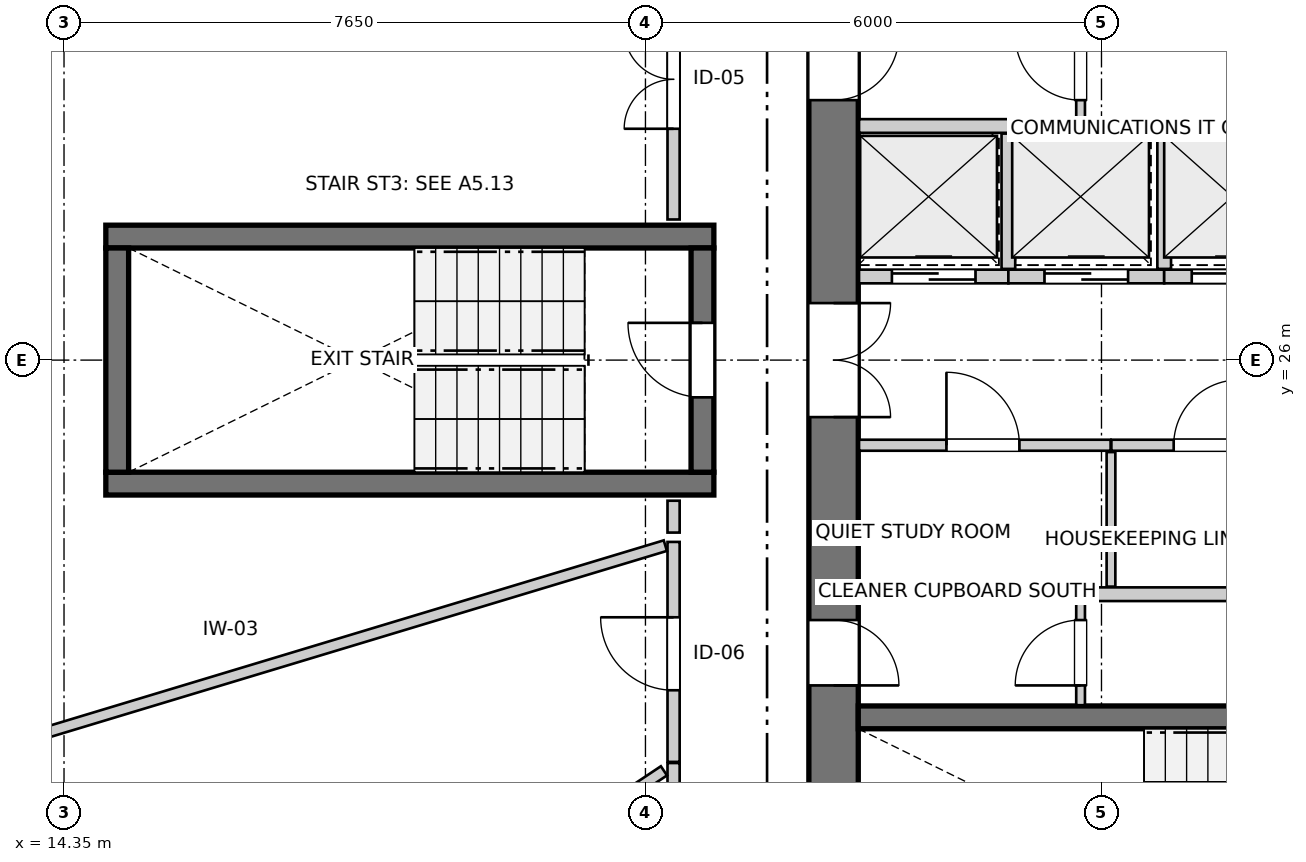
"""IFC4 building model, lengths in metres.
Left out: names, types, materials, properties, quantities, classifications, styles, units other than length and angle.
Written with IfcOpenShell. Run it as: python <this file> out.ifc"""

import sys

from ifc_helpers import new_model, si_unit, direction, frame, frame_2d, origin, place, context, subcontext, project, spatial, rectangle, extrude, source, transform, mapped, element, fill, save


model = new_model("IFC4")
c1 = context("Model", 3, precision=1e-05, world=origin(), true_north=direction((0.0, 1.0)))
c2 = subcontext(c1, "Body", "Model", "MODEL_VIEW")
j1 = project(units=[si_unit("LENGTHUNIT", "METRE"), si_unit("PLANEANGLEUNIT", "RADIAN")], contexts=[c1])
p1 = place(None, origin())
s1 = spatial("IfcSite", under=j1, at=p1, CompositionType="ELEMENT")
p2 = place(p1, origin())
s2 = spatial("IfcBuilding", under=s1, at=p2, CompositionType="ELEMENT")
p3 = place(p2, frame((0.0, 0.0, 142.6)))
s3 = spatial("IfcBuildingStorey", under=s2, at=p3, CompositionType="ELEMENT", Elevation=142.6)
p4 = place(p3, frame((24.475, 33.8, 0.0), z_axis=(0.0, 0.0, 1.0), x_axis=(0.0, -1.0, 0.0)))
e1 = element("IfcWall", 1, at=p4, inside=s3, PredefinedType="SHEAR", context=c2, shape_type="SweptSolid", body=[
    extrude(rectangle(XDim=15.6, YDim=0.65, at=frame_2d((7.8, 0.0))), origin(), (0.0, 0.0, 1.0), 2.95),
])
p5 = place(p4, frame((7.05, 0.0, 0.0)))
e2 = element("IfcOpeningElement", 2, at=p5, cuts=e1, PredefinedType="OPENING", context=c2, shape_type="SweptSolid", body=[
    extrude(rectangle(XDim=1.5, YDim=2.15, at=frame_2d((0.75, 1.075))), frame((0.0, 0.335, 0.0), z_axis=(0.0, -1.0, 0.0), x_axis=(1.0, 0.0, 0.0)), (0.0, 0.0, 1.0), 0.67),
])
p6 = place(p4, frame((3.52, 0.0, 0.0)))
e3 = element("IfcOpeningElement", 3, at=p6, cuts=e1, PredefinedType="OPENING", context=c2, shape_type="SweptSolid", body=[
    extrude(rectangle(XDim=0.86, YDim=2.05, at=frame_2d((0.43, 1.025))), frame((0.0, 0.335, 0.0), z_axis=(0.0, -1.0, 0.0), x_axis=(1.0, 0.0, 0.0)), (0.0, 0.0, 1.0), 0.67),
])
p7 = place(p4, frame((11.22, 0.0, 0.0)))
e4 = element("IfcOpeningElement", 4, at=p7, cuts=e1, PredefinedType="OPENING", context=c2, shape_type="SweptSolid", body=[
    extrude(rectangle(XDim=0.86, YDim=2.05, at=frame_2d((0.43, 1.025))), frame((0.0, 0.335, 0.0), z_axis=(0.0, -1.0, 0.0), x_axis=(1.0, 0.0, 0.0)), (0.0, 0.0, 1.0), 0.67),
])
p8 = place(p3, frame((24.8, 21.3, 0.0), z_axis=(0.0, 0.0, 1.0), x_axis=(1.0, 0.0, 0.0)))
e5 = element("IfcWall", 5, at=p8, inside=s3, PredefinedType="SHEAR", context=c2, shape_type="SweptSolid", body=[
    extrude(rectangle(XDim=11.1, YDim=0.3, at=frame_2d((5.55, 0.0))), origin(), (0.0, 0.0, 1.0), 2.95),
])
p9 = place(p8, frame((6.22, 0.0, 0.0)))
e6 = element("IfcOpeningElement", 6, at=p9, cuts=e5, PredefinedType="OPENING", context=c2, shape_type="SweptSolid", body=[
    extrude(rectangle(XDim=0.98, YDim=2.15, at=frame_2d((0.49, 1.075))), frame((0.0, 0.16, 0.0), z_axis=(0.0, -1.0, 0.0), x_axis=(1.0, 0.0, 0.0)), (0.0, 0.0, 1.0), 0.32),
])
p10 = place(p8, frame((9.15, 0.0, 0.0)))
e7 = element("IfcOpeningElement", 7, at=p10, cuts=e5, PredefinedType="OPENING", context=c2, shape_type="SweptSolid", body=[
    extrude(rectangle(XDim=1.15, YDim=2.15, at=frame_2d((0.575, 1.075))), frame((0.0, 0.16, 0.0), z_axis=(0.0, -1.0, 0.0), x_axis=(1.0, 0.0, 0.0)), (0.0, 0.0, 1.0), 0.32),
])
for number, where, z_axis, x_axis in (
    (8, (14.9, 24.375, 0.0), (0.0, 0.0, 1.0), (1.0, 0.0, 0.0)),
    (9, (22.9, 27.625, 0.0), (0.0, 0.0, 1.0), (-1.0, 0.0, 0.0)),
):
    element("IfcWall", number, at=place(p3, frame(where, z_axis=z_axis, x_axis=x_axis)), inside=s3, PredefinedType="SHEAR", context=c2, shape_type="SweptSolid", body=[
        extrude(rectangle(XDim=8.0, YDim=0.3, at=frame_2d((4.0, 0.0))), origin(), (0.0, 0.0, 1.0), 2.95),
    ])
p11 = place(p3, frame((15.05, 27.475, 0.0), z_axis=(0.0, 0.0, 1.0), x_axis=(0.0, -1.0, 0.0)))
e10 = element("IfcWall", 10, at=p11, inside=s3, PredefinedType="SHEAR", context=c2, shape_type="SweptSolid", body=[
    extrude(rectangle(XDim=2.95, YDim=0.3, at=frame_2d((1.475, 0.0))), origin(), (0.0, 0.0, 1.0), 2.95),
])
p12 = place(p3, frame((22.75, 24.525, 0.0), z_axis=(0.0, 0.0, 1.0), x_axis=(0.0, 1.0, 0.0)))
e11 = element("IfcWall", 11, at=p12, inside=s3, PredefinedType="SHEAR", context=c2, shape_type="SweptSolid", body=[
    extrude(rectangle(XDim=2.95, YDim=0.3, at=frame_2d((1.475, 0.0))), origin(), (0.0, 0.0, 1.0), 2.95),
])
p13 = place(p12, frame((0.985, 0.0, 0.0)))
e12 = element("IfcOpeningElement", 12, at=p13, cuts=e11, PredefinedType="OPENING", context=c2, shape_type="SweptSolid", body=[
    extrude(rectangle(XDim=0.98, YDim=2.15, at=frame_2d((0.49, 1.075))), frame((0.0, 0.16, 0.0), z_axis=(0.0, -1.0, 0.0), x_axis=(1.0, 0.0, 0.0)), (0.0, 0.0, 1.0), 0.32),
])
p14 = place(p3, frame((24.81, 22.92, 0.0), z_axis=(0.0, 0.0, 1.0), x_axis=(1.0, 0.0, 0.0)))
e13 = element("IfcWall", 13, at=p14, inside=s3, PredefinedType="PARTITIONING", context=c2, shape_type="SweptSolid", body=[
    extrude(rectangle(XDim=5.84, YDim=0.18, at=frame_2d((2.92, 0.0))), origin(), (0.0, 0.0, 1.0), 2.95),
])
p15 = place(p3, frame((24.81, 24.88, 0.0), z_axis=(0.0, 0.0, 1.0), x_axis=(1.0, 0.0, 0.0)))
e14 = element("IfcWall", 14, at=p15, inside=s3, PredefinedType="PARTITIONING", context=c2, shape_type="SweptSolid", body=[
    extrude(rectangle(XDim=3.31, YDim=0.145, at=frame_2d((1.655, 0.0))), origin(), (0.0, 0.0, 1.0), 2.95),
])
p16 = place(p15, frame((1.15, 0.0, 0.0)))
e15 = element("IfcOpeningElement", 15, at=p16, cuts=e14, PredefinedType="OPENING", context=c2, shape_type="SweptSolid", body=[
    extrude(rectangle(XDim=0.96, YDim=2.1, at=frame_2d((0.48, 1.05))), frame((0.0, 0.083, 0.0), z_axis=(0.0, -1.0, 0.0), x_axis=(1.0, 0.0, 0.0)), (0.0, 0.0, 1.0), 0.165),
])
p17 = place(p3, frame((28.13, 24.88, 0.0), z_axis=(0.0, 0.0, 1.0), x_axis=(1.0, 0.0, 0.0)))
e16 = element("IfcWall", 16, at=p17, inside=s3, PredefinedType="PARTITIONING", context=c2, shape_type="SweptSolid", body=[
    extrude(rectangle(XDim=2.52, YDim=0.145, at=frame_2d((1.26, 0.0))), origin(), (0.0, 0.0, 1.0), 2.95),
])
p18 = place(p17, frame((0.82, 0.0, 0.0)))
e17 = element("IfcOpeningElement", 17, at=p18, cuts=e16, PredefinedType="OPENING", context=c2, shape_type="SweptSolid", body=[
    extrude(rectangle(XDim=0.86, YDim=2.05, at=frame_2d((0.43, 1.025))), frame((0.0, 0.083, 0.0), z_axis=(0.0, -1.0, 0.0), x_axis=(1.0, 0.0, 0.0)), (0.0, 0.0, 1.0), 0.165),
])
p19 = place(p3, frame((28.125, 23.02, 0.0), z_axis=(0.0, 0.0, 1.0), x_axis=(0.0, 1.0, 0.0)))
e18 = element("IfcWall", 18, at=p19, inside=s3, PredefinedType="PARTITIONING", context=c2, shape_type="SweptSolid", body=[
    extrude(rectangle(XDim=1.77, YDim=0.115, at=frame_2d((0.885, 0.0))), origin(), (0.0, 0.0, 1.0), 2.95),
])
p20 = place(p3, frame((24.81, 29.08, 0.0), z_axis=(0.0, 0.0, 1.0), x_axis=(1.0, 0.0, 0.0)))
e19 = element("IfcWall", 19, at=p20, inside=s3, PredefinedType="PARTITIONING", context=c2, shape_type="SweptSolid", body=[
    extrude(rectangle(XDim=5.84, YDim=0.18, at=frame_2d((2.92, 0.0))), origin(), (0.0, 0.0, 1.0), 2.95),
])
p21 = place(p3, frame((24.81, 27.1, 0.0), z_axis=(0.0, 0.0, 1.0), x_axis=(1.0, 0.0, 0.0)))
e20 = element("IfcWall", 20, at=p21, inside=s3, PredefinedType="PARTITIONING", context=c2, shape_type="SweptSolid", body=[
    extrude(rectangle(XDim=1.965, YDim=0.18, at=frame_2d((0.982, 0.0))), origin(), (0.0, 0.0, 1.0), 2.95),
])
p22 = place(p21, frame((0.433, 0.0, 0.0)))
e21 = element("IfcOpeningElement", 21, at=p22, cuts=e20, PredefinedType="OPENING", context=c2, shape_type="SweptSolid", body=[
    extrude(rectangle(XDim=1.1, YDim=2.15, at=frame_2d((0.55, 1.075))), frame((0.0, 0.1, 0.0), z_axis=(0.0, -1.0, 0.0), x_axis=(1.0, 0.0, 0.0)), (0.0, 0.0, 1.0), 0.2),
])
p23 = place(p3, frame((26.775, 27.1, 0.0), z_axis=(0.0, 0.0, 1.0), x_axis=(1.0, 0.0, 0.0)))
e22 = element("IfcWall", 22, at=p23, inside=s3, PredefinedType="PARTITIONING", context=c2, shape_type="SweptSolid", body=[
    extrude(rectangle(XDim=2.05, YDim=0.18, at=frame_2d((1.025, 0.0))), origin(), (0.0, 0.0, 1.0), 2.95),
])
p24 = place(p23, frame((0.475, 0.0, 0.0)))
e23 = element("IfcOpeningElement", 23, at=p24, cuts=e22, PredefinedType="OPENING", context=c2, shape_type="SweptSolid", body=[
    extrude(rectangle(XDim=1.1, YDim=2.15, at=frame_2d((0.55, 1.075))), frame((0.0, 0.1, 0.0), z_axis=(0.0, -1.0, 0.0), x_axis=(1.0, 0.0, 0.0)), (0.0, 0.0, 1.0), 0.2),
])
p25 = place(p3, frame((26.775, 27.2, 0.0), z_axis=(0.0, 0.0, 1.0), x_axis=(0.0, 1.0, 0.0)))
e24 = element("IfcWall", 24, at=p25, inside=s3, PredefinedType="PARTITIONING", context=c2, shape_type="SweptSolid", body=[
    extrude(rectangle(XDim=1.78, YDim=0.18, at=frame_2d((0.89, 0.0))), origin(), (0.0, 0.0, 1.0), 2.95),
])
p26 = place(p3, frame((28.825, 27.1, 0.0), z_axis=(0.0, 0.0, 1.0), x_axis=(1.0, 0.0, 0.0)))
e25 = element("IfcWall", 25, at=p26, inside=s3, PredefinedType="PARTITIONING", context=c2, shape_type="SweptSolid", body=[
    extrude(rectangle(XDim=1.825, YDim=0.18, at=frame_2d((0.913, 0.0))), origin(), (0.0, 0.0, 1.0), 2.95),
])
p27 = place(p26, frame((0.363, 0.0, 0.0)))
e26 = element("IfcOpeningElement", 26, at=p27, cuts=e25, PredefinedType="OPENING", context=c2, shape_type="SweptSolid", body=[
    extrude(rectangle(XDim=1.1, YDim=2.15, at=frame_2d((0.55, 1.075))), frame((0.0, 0.1, 0.0), z_axis=(0.0, -1.0, 0.0), x_axis=(1.0, 0.0, 0.0)), (0.0, 0.0, 1.0), 0.2),
])
p28 = place(p3, frame((28.825, 27.2, 0.0), z_axis=(0.0, 0.0, 1.0), x_axis=(0.0, 1.0, 0.0)))
e27 = element("IfcWall", 27, at=p28, inside=s3, PredefinedType="PARTITIONING", context=c2, shape_type="SweptSolid", body=[
    extrude(rectangle(XDim=1.78, YDim=0.18, at=frame_2d((0.89, 0.0))), origin(), (0.0, 0.0, 1.0), 2.95),
])
p29 = place(p3, frame((27.725, 21.46, 0.0), z_axis=(0.0, 0.0, 1.0), x_axis=(0.0, 1.0, 0.0)))
e28 = element("IfcWall", 28, at=p29, inside=s3, PredefinedType="PARTITIONING", context=c2, shape_type="SweptSolid", body=[
    extrude(rectangle(XDim=1.38, YDim=0.115, at=frame_2d((0.69, 0.0))), origin(), (0.0, 0.0, 1.0), 2.95),
])
p30 = place(p29, frame((0.26, 0.0, 0.0)))
e29 = element("IfcOpeningElement", 29, at=p30, cuts=e28, PredefinedType="OPENING", context=c2, shape_type="SweptSolid", body=[
    extrude(rectangle(XDim=0.86, YDim=2.05, at=frame_2d((0.43, 1.025))), frame((0.0, 0.067, 0.0), z_axis=(0.0, -1.0, 0.0), x_axis=(1.0, 0.0, 0.0)), (0.0, 0.0, 1.0), 0.135),
])
p31 = place(p3, frame((27.725, 29.16, 0.0), z_axis=(0.0, 0.0, 1.0), x_axis=(0.0, 1.0, 0.0)))
e30 = element("IfcWall", 30, at=p31, inside=s3, PredefinedType="PARTITIONING", context=c2, shape_type="SweptSolid", body=[
    extrude(rectangle(XDim=1.38, YDim=0.115, at=frame_2d((0.69, 0.0))), origin(), (0.0, 0.0, 1.0), 2.95),
])
p32 = place(p31, frame((0.26, 0.0, 0.0)))
e31 = element("IfcOpeningElement", 31, at=p32, cuts=e30, PredefinedType="OPENING", context=c2, shape_type="SweptSolid", body=[
    extrude(rectangle(XDim=0.86, YDim=2.05, at=frame_2d((0.43, 1.025))), frame((0.0, 0.067, 0.0), z_axis=(0.0, -1.0, 0.0), x_axis=(1.0, 0.0, 0.0)), (0.0, 0.0, 1.0), 0.135),
])
p33 = place(p3, frame((22.37, 14.496, 0.0), z_axis=(0.0, 0.0, 1.0), x_axis=(0.0, 1.0, 0.0)))
e32 = element("IfcWall", 32, at=p33, inside=s3, PredefinedType="PARTITIONING", context=c2, shape_type="SweptSolid", body=[
    extrude(rectangle(XDim=6.203, YDim=0.16, at=frame_2d((3.102, 0.0))), origin(), (0.0, 0.0, 1.0), 2.95),
])
p34 = place(p33, frame((2.613, 0.0, 0.0)))
e33 = element("IfcOpeningElement", 33, at=p34, cuts=e32, PredefinedType="OPENING", context=c2, shape_type="SweptSolid", body=[
    extrude(rectangle(XDim=0.96, YDim=2.1, at=frame_2d((0.48, 1.05))), frame((0.0, 0.09, 0.0), z_axis=(0.0, -1.0, 0.0), x_axis=(1.0, 0.0, 0.0)), (0.0, 0.0, 1.0), 0.18),
])
p35 = place(p3, frame((22.37, 27.85, 0.0), z_axis=(0.0, 0.0, 1.0), x_axis=(0.0, 1.0, 0.0)))
e34 = element("IfcWall", 34, at=p35, inside=s3, PredefinedType="PARTITIONING", context=c2, shape_type="SweptSolid", body=[
    extrude(rectangle(XDim=3.646, YDim=0.16, at=frame_2d((1.823, 0.0))), origin(), (0.0, 0.0, 1.0), 2.95),
])
p36 = place(p35, frame((1.194, 0.0, 0.0)))
e35 = element("IfcOpeningElement", 35, at=p36, cuts=e34, PredefinedType="OPENING", context=c2, shape_type="SweptSolid", body=[
    extrude(rectangle(XDim=1.3, YDim=2.1, at=frame_2d((0.65, 1.05))), frame((0.0, 0.09, 0.0), z_axis=(0.0, -1.0, 0.0), x_axis=(1.0, 0.0, 0.0)), (0.0, 0.0, 1.0), 0.18),
])
p37 = place(p3, frame((22.37, 20.714, 0.0), z_axis=(0.0, 0.0, 1.0), x_axis=(0.0, 1.0, 0.0)))
e36 = element("IfcWall", 36, at=p37, inside=s3, PredefinedType="PARTITIONING", context=c2, shape_type="SweptSolid", body=[
    extrude(rectangle(XDim=2.894, YDim=0.16, at=frame_2d((1.447, 0.0))), origin(), (0.0, 0.0, 1.0), 2.95),
])
p38 = place(p37, frame((0.942, 0.0, 0.0)))
e37 = element("IfcOpeningElement", 37, at=p38, cuts=e36, PredefinedType="OPENING", context=c2, shape_type="SweptSolid", body=[
    extrude(rectangle(XDim=0.96, YDim=2.1, at=frame_2d((0.48, 1.05))), frame((0.0, 0.09, 0.0), z_axis=(0.0, -1.0, 0.0), x_axis=(1.0, 0.0, 0.0)), (0.0, 0.0, 1.0), 0.18),
])
p39 = place(p3, frame((11.165, 20.211, 0.0), z_axis=(0.0, 0.0, 1.0), x_axis=(0.957361241888, 0.288893496865, 0.0)))
e38 = element("IfcWall", 38, at=p39, inside=s3, PredefinedType="PARTITIONING", context=c2, shape_type="SweptSolid", body=[
    extrude(rectangle(XDim=11.59, YDim=0.145, at=frame_2d((5.795, 0.0))), origin(), (0.0, 0.0, 1.0), 2.95),
])
p40 = place(p3, frame((15.355, 16.005, 0.0), z_axis=(0.0, 0.0, 1.0), x_axis=(0.83207298021, 0.55466616591, 0.0)))
e39 = element("IfcWall", 39, at=p40, inside=s3, PredefinedType="PARTITIONING", context=c2, shape_type="SweptSolid", body=[
    extrude(rectangle(XDim=8.278, YDim=0.145, at=frame_2d((4.139, 0.0))), origin(), (0.0, 0.0, 1.0), 2.95),
])
p41 = place(p3, frame((22.37, 23.731, 0.0), z_axis=(0.0, 0.0, 1.0), x_axis=(0.0, 1.0, 0.0)))
e40 = element("IfcWall", 40, at=p41, inside=s3, PredefinedType="PARTITIONING", context=c2, shape_type="SweptSolid", body=[
    extrude(rectangle(XDim=0.419, YDim=0.16, at=frame_2d((0.209, 0.0))), origin(), (0.0, 0.0, 1.0), 2.95),
])
m1 = source(origin(), c2, "Body", "SweptSolid", [
    extrude(rectangle(XDim=0.98, YDim=2.15, at=frame_2d((0.49, 1.075))), frame((0.0, 0.025, 0.0), z_axis=(0.0, -1.0, 0.0), x_axis=(1.0, 0.0, 0.0)), (0.0, 0.0, 1.0), 0.05),
])
p42 = place(p13, origin())
e41 = element("IfcDoor", 41, at=p42, inside=s3, OperationType="SINGLE_SWING_RIGHT", PredefinedType="DOOR", context=c2, shape_type="MappedRepresentation", body=[
    mapped(m1, transform((0.0, 0.0, 0.0), x_axis=(1.0, 0.0, 0.0), y_axis=(0.0, 1.0, 0.0), z_axis=(0.0, 0.0, 1.0), scale=1.0)),
])
fill(e12, e41)
m2 = source(origin(), c2, "Body", "SweptSolid", [
    extrude(rectangle(XDim=1.5, YDim=2.15, at=frame_2d((0.75, 1.075))), frame((0.0, 0.025, 0.0), z_axis=(0.0, -1.0, 0.0), x_axis=(1.0, 0.0, 0.0)), (0.0, 0.0, 1.0), 0.05),
])
p43 = place(p5, origin())
e42 = element("IfcDoor", 42, at=p43, inside=s3, OperationType="DOUBLE_DOOR_SINGLE_SWING", PredefinedType="DOOR", context=c2, shape_type="MappedRepresentation", body=[
    mapped(m2, transform((0.0, 0.0, 0.0), x_axis=(1.0, 0.0, 0.0), y_axis=(0.0, 1.0, 0.0), z_axis=(0.0, 0.0, 1.0), scale=1.0)),
])
fill(e2, e42)
m3 = source(origin(), c2, "Body", "SweptSolid", [
    extrude(rectangle(XDim=0.86, YDim=2.05, at=frame_2d((0.43, 1.025))), frame((0.0, 0.025, 0.0), z_axis=(0.0, -1.0, 0.0), x_axis=(1.0, 0.0, 0.0)), (0.0, 0.0, 1.0), 0.05),
])
p44 = place(p6, origin())
e43 = element("IfcDoor", 43, at=p44, inside=s3, OperationType="SINGLE_SWING_LEFT", PredefinedType="DOOR", context=c2, shape_type="MappedRepresentation", body=[
    mapped(m3, transform((0.0, 0.0, 0.0), x_axis=(1.0, 0.0, 0.0), y_axis=(0.0, 1.0, 0.0), z_axis=(0.0, 0.0, 1.0), scale=1.0)),
])
fill(e3, e43)
p45 = place(p7, origin())
e44 = element("IfcDoor", 44, at=p45, inside=s3, OperationType="SINGLE_SWING_RIGHT", PredefinedType="DOOR", context=c2, shape_type="MappedRepresentation", body=[
    mapped(m3, transform((0.0, 0.0, 0.0), x_axis=(1.0, 0.0, 0.0), y_axis=(0.0, 1.0, 0.0), z_axis=(0.0, 0.0, 1.0), scale=1.0)),
])
fill(e4, e44)
m4 = source(origin(), c2, "Body", "SweptSolid", [
    extrude(rectangle(XDim=0.96, YDim=2.1, at=frame_2d((0.48, 1.05))), frame((0.0, 0.025, 0.0), z_axis=(0.0, -1.0, 0.0), x_axis=(1.0, 0.0, 0.0)), (0.0, 0.0, 1.0), 0.05),
])
p46 = place(p16, origin())
e45 = element("IfcDoor", 45, at=p46, inside=s3, OperationType="SINGLE_SWING_LEFT", PredefinedType="DOOR", context=c2, shape_type="MappedRepresentation", body=[
    mapped(m4, transform((0.0, 0.0, 0.0), x_axis=(1.0, 0.0, 0.0), y_axis=(0.0, 1.0, 0.0), z_axis=(0.0, 0.0, 1.0), scale=1.0)),
])
fill(e15, e45)
p47 = place(p18, origin())
e46 = element("IfcDoor", 46, at=p47, inside=s3, OperationType="SINGLE_SWING_RIGHT", PredefinedType="DOOR", context=c2, shape_type="MappedRepresentation", body=[
    mapped(m3, transform((0.0, 0.0, 0.0), x_axis=(1.0, 0.0, 0.0), y_axis=(0.0, 1.0, 0.0), z_axis=(0.0, 0.0, 1.0), scale=1.0)),
])
fill(e17, e46)
m5 = source(origin(), c2, "Body", "SweptSolid", [
    extrude(rectangle(XDim=1.1, YDim=2.15, at=frame_2d((0.55, 1.075))), frame((0.0, 0.025, 0.0), z_axis=(0.0, -1.0, 0.0), x_axis=(1.0, 0.0, 0.0)), (0.0, 0.0, 1.0), 0.05),
])
p48 = place(p22, origin())
e47 = element("IfcDoor", 47, at=p48, inside=s3, OperationType="DOUBLE_DOOR_SLIDING", PredefinedType="DOOR", context=c2, shape_type="MappedRepresentation", body=[
    mapped(m5, transform((0.0, 0.0, 0.0), x_axis=(1.0, 0.0, 0.0), y_axis=(0.0, 1.0, 0.0), z_axis=(0.0, 0.0, 1.0), scale=1.0)),
])
fill(e21, e47)
p49 = place(p24, origin())
e48 = element("IfcDoor", 48, at=p49, inside=s3, OperationType="DOUBLE_DOOR_SLIDING", PredefinedType="DOOR", context=c2, shape_type="MappedRepresentation", body=[
    mapped(m5, transform((0.0, 0.0, 0.0), x_axis=(1.0, 0.0, 0.0), y_axis=(0.0, 1.0, 0.0), z_axis=(0.0, 0.0, 1.0), scale=1.0)),
])
fill(e23, e48)
p50 = place(p27, origin())
e49 = element("IfcDoor", 49, at=p50, inside=s3, OperationType="DOUBLE_DOOR_SLIDING", PredefinedType="DOOR", context=c2, shape_type="MappedRepresentation", body=[
    mapped(m5, transform((0.0, 0.0, 0.0), x_axis=(1.0, 0.0, 0.0), y_axis=(0.0, 1.0, 0.0), z_axis=(0.0, 0.0, 1.0), scale=1.0)),
])
fill(e26, e49)
p51 = place(p30, origin())
e50 = element("IfcDoor", 50, at=p51, inside=s3, OperationType="SINGLE_SWING_LEFT", PredefinedType="DOOR", context=c2, shape_type="MappedRepresentation", body=[
    mapped(m3, transform((0.0, 0.0, 0.0), x_axis=(1.0, 0.0, 0.0), y_axis=(0.0, 1.0, 0.0), z_axis=(0.0, 0.0, 1.0), scale=1.0)),
])
fill(e29, e50)
p52 = place(p32, origin())
e51 = element("IfcDoor", 51, at=p52, inside=s3, OperationType="SINGLE_SWING_RIGHT", PredefinedType="DOOR", context=c2, shape_type="MappedRepresentation", body=[
    mapped(m3, transform((0.0, 0.0, 0.0), x_axis=(1.0, 0.0, 0.0), y_axis=(0.0, 1.0, 0.0), z_axis=(0.0, 0.0, 1.0), scale=1.0)),
])
fill(e31, e51)
m6 = source(origin(), c2, "Body", "SweptSolid", [
    extrude(rectangle(XDim=1.3, YDim=2.1, at=frame_2d((0.65, 1.05))), frame((0.0, 0.025, 0.0), z_axis=(0.0, -1.0, 0.0), x_axis=(1.0, 0.0, 0.0)), (0.0, 0.0, 1.0), 0.05),
])
p53 = place(p36, origin())
e52 = element("IfcDoor", 52, at=p53, inside=s3, OperationType="DOUBLE_DOOR_SINGLE_SWING", PredefinedType="DOOR", context=c2, shape_type="MappedRepresentation", body=[
    mapped(m6, transform((0.0, 0.0, 0.0), x_axis=(1.0, 0.0, 0.0), y_axis=(0.0, 1.0, 0.0), z_axis=(0.0, 0.0, 1.0), scale=1.0)),
])
fill(e35, e52)
p54 = place(p38, origin())
e53 = element("IfcDoor", 53, at=p54, inside=s3, OperationType="SINGLE_SWING_RIGHT", PredefinedType="DOOR", context=c2, shape_type="MappedRepresentation", body=[
    mapped(m4, transform((0.0, 0.0, 0.0), x_axis=(1.0, 0.0, 0.0), y_axis=(0.0, 1.0, 0.0), z_axis=(0.0, 0.0, 1.0), scale=1.0)),
])
fill(e37, e53)
save(model, sys.argv[1])
